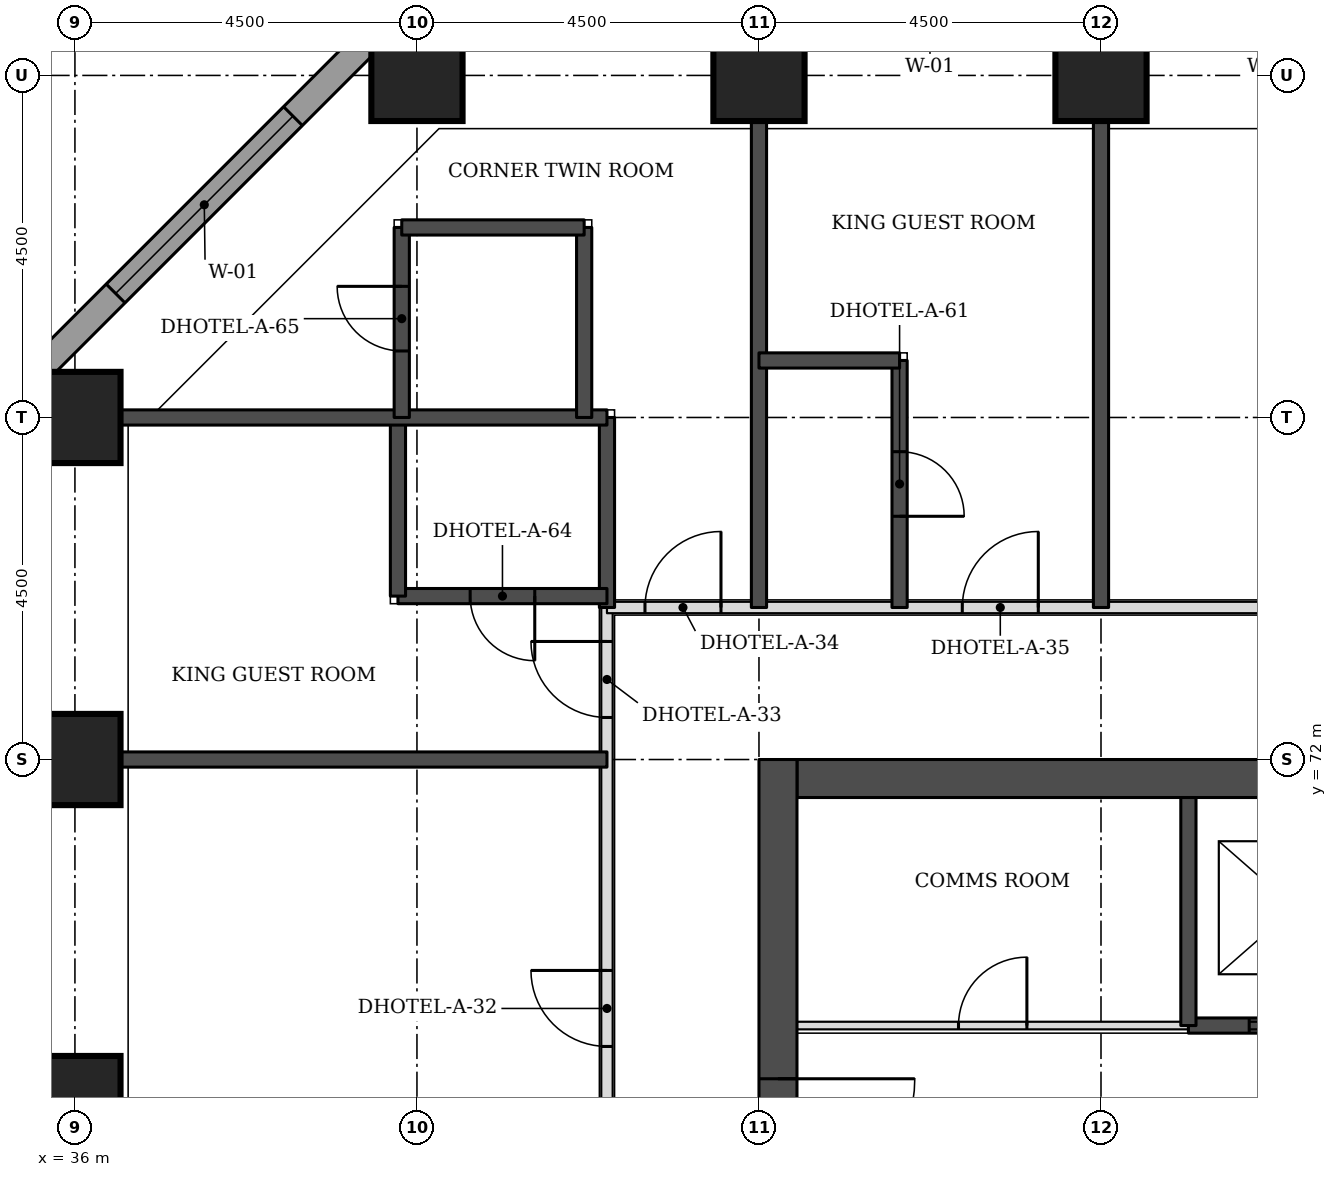
"""IFC4 building model, lengths in metres.
Left out: names, types, materials, properties, quantities, classifications, styles, units other than length and angle.
Written with IfcOpenShell. Run it as: python <this file> out.ifc"""

import sys

from ifc_helpers import new_model, si_unit, direction, frame, frame_2d, origin, origin_2d, place, context, subcontext, project, spatial, rectangle, extrude, element, fill, save


model = new_model("IFC4")
c1 = context("Model", 3, precision=1e-05, world=origin(), true_north=direction((0.0, 1.0)))
c2 = subcontext(c1, "Body", "Model", "MODEL_VIEW")
j1 = project(units=[si_unit("LENGTHUNIT", "METRE"), si_unit("PLANEANGLEUNIT", "RADIAN")], contexts=[c1])
p1 = place(None, origin())
s1 = spatial("IfcSite", under=j1, at=p1, CompositionType="ELEMENT")
p2 = place(p1, origin())
s2 = spatial("IfcBuilding", under=s1, at=p2, CompositionType="ELEMENT")
p3 = place(p2, frame((0.0, 0.0, 26.4)))
s3 = spatial("IfcBuildingStorey", under=s2, at=p3, CompositionType="ELEMENT", Elevation=26.4)
for number, where, z_axis, x_axis in (
    (1, (36.0, 67.5, 0.0), (0.0, 0.0, 1.0), (1.0, 0.0, 0.0)),
    (2, (36.0, 72.0, 0.0), (0.0, 0.0, 1.0), (1.0, 0.0, 0.0)),
    (3, (36.0, 76.5, 0.0), (0.0, 0.0, 1.0), (1.0, 0.0, 0.0)),
    (4, (40.5, 81.0, 0.0), (0.0, 0.0, 1.0), (1.0, 0.0, 0.0)),
    (5, (45.0, 81.0, 0.0), (0.0, 0.0, 1.0), (1.0, 0.0, 0.0)),
    (6, (49.5, 81.0, 0.0), (0.0, 0.0, 1.0), (1.0, 0.0, 0.0)),
):
    element("IfcColumn", number, at=place(p3, frame(where, z_axis=z_axis, x_axis=x_axis)), inside=s3, PredefinedType="COLUMN", context=c2, shape_type="SweptSolid", body=[
        extrude(rectangle(XDim=1.2, YDim=1.2, at=origin_2d()), origin(), (0.0, 0.0, 1.0), 3.3),
    ])
p4 = place(p3, frame((45.5, 71.75, 0.0), z_axis=(0.0, 0.0, 1.0), x_axis=(1.0, 0.0, 0.0)))
e7 = element("IfcWall", 7, at=p4, inside=s3, PredefinedType="SHEAR", context=c2, shape_type="SweptSolid", body=[
    extrude(rectangle(XDim=21.5, YDim=0.5, at=frame_2d((10.75, 0.0))), origin(), (0.0, 0.0, 1.0), 3.3),
])
p5 = place(p3, frame((45.25, 49.5, 0.0), z_axis=(0.0, 0.0, 1.0), x_axis=(0.0, 1.0, 0.0)))
e8 = element("IfcWall", 8, at=p5, inside=s3, PredefinedType="SHEAR", context=c2, shape_type="SweptSolid", body=[
    extrude(rectangle(XDim=22.5, YDim=0.5, at=frame_2d((11.25, 0.0))), origin(), (0.0, 0.0, 1.0), 3.3),
])
p6 = place(p5, frame((4.2, 0.0, 0.0)))
e9 = element("IfcOpeningElement", 9, at=p6, cuts=e8, PredefinedType="OPENING", context=c2, shape_type="SweptSolid", body=[
    extrude(rectangle(XDim=1.8, YDim=2.1, at=frame_2d((0.9, 1.05))), frame((0.0, 0.26, 0.0), z_axis=(0.0, -1.0, 0.0), x_axis=(1.0, 0.0, 0.0)), (0.0, 0.0, 1.0), 0.52),
])
p7 = place(p5, frame((6.9, 0.0, 0.0)))
e10 = element("IfcOpeningElement", 10, at=p7, cuts=e8, PredefinedType="OPENING", context=c2, shape_type="SweptSolid", body=[
    extrude(rectangle(XDim=1.1, YDim=2.1, at=frame_2d((0.55, 1.05))), frame((0.0, 0.26, 0.0), z_axis=(0.0, -1.0, 0.0), x_axis=(1.0, 0.0, 0.0)), (0.0, 0.0, 1.0), 0.52),
])
p8 = place(p5, frame((13.6, 0.0, 0.0)))
e11 = element("IfcOpeningElement", 11, at=p8, cuts=e8, PredefinedType="OPENING", context=c2, shape_type="SweptSolid", body=[
    extrude(rectangle(XDim=1.1, YDim=2.1, at=frame_2d((0.55, 1.05))), frame((0.0, 0.26, 0.0), z_axis=(0.0, -1.0, 0.0), x_axis=(1.0, 0.0, 0.0)), (0.0, 0.0, 1.0), 0.52),
])
p9 = place(p5, frame((16.5, 0.0, 0.0)))
e12 = element("IfcOpeningElement", 12, at=p9, cuts=e8, PredefinedType="OPENING", context=c2, shape_type="SweptSolid", body=[
    extrude(rectangle(XDim=1.8, YDim=2.1, at=frame_2d((0.9, 1.05))), frame((0.0, 0.26, 0.0), z_axis=(0.0, -1.0, 0.0), x_axis=(1.0, 0.0, 0.0)), (0.0, 0.0, 1.0), 0.52),
])
p10 = place(p3, frame((40.23, 81.826, 0.0), z_axis=(0.0, 0.0, 1.0), x_axis=(-0.707106781187, -0.707106781187, 0.0)))
e13 = element("IfcWall", 13, at=p10, inside=s3, PredefinedType="STANDARD", context=c2, shape_type="SweptSolid", body=[
    extrude(rectangle(XDim=7.151, YDim=0.35, at=frame_2d((3.576, 0.0))), origin(), (0.0, 0.0, 1.0), 3.055),
])
p11 = place(p10, frame((1.926, 0.0, 0.8)))
e14 = element("IfcOpeningElement", 14, at=p11, cuts=e13, PredefinedType="OPENING", context=c2, shape_type="SweptSolid", body=[
    extrude(rectangle(XDim=3.3, YDim=1.5, at=frame_2d((1.65, 0.75))), frame((0.0, 0.185, 0.0), z_axis=(0.0, -1.0, 0.0), x_axis=(1.0, 0.0, 0.0)), (0.0, 0.0, 1.0), 0.37),
])
p12 = place(p3, frame((43.0, 56.0, 0.0), z_axis=(0.0, 0.0, 1.0), x_axis=(0.0, 1.0, 0.0)))
e15 = element("IfcWall", 15, at=p12, inside=s3, PredefinedType="PARTITIONING", context=c2, shape_type="SweptSolid", body=[
    extrude(rectangle(XDim=18.0, YDim=0.15, at=frame_2d((9.0, 0.0))), origin(), (0.0, 0.0, 1.0), 3.08),
])
p13 = place(p12, frame((12.225, 0.0, 0.0)))
e16 = element("IfcOpeningElement", 16, at=p13, cuts=e15, PredefinedType="OPENING", context=c2, shape_type="SweptSolid", body=[
    extrude(rectangle(XDim=1.0, YDim=2.1, at=frame_2d((0.5, 1.05))), frame((0.0, 0.085, 0.0), z_axis=(0.0, -1.0, 0.0), x_axis=(1.0, 0.0, 0.0)), (0.0, 0.0, 1.0), 0.17),
])
p14 = place(p12, frame((16.553, 0.0, 0.0)))
e17 = element("IfcOpeningElement", 17, at=p14, cuts=e15, PredefinedType="OPENING", context=c2, shape_type="SweptSolid", body=[
    extrude(rectangle(XDim=1.0, YDim=2.1, at=frame_2d((0.5, 1.05))), frame((0.0, 0.085, 0.0), z_axis=(0.0, -1.0, 0.0), x_axis=(1.0, 0.0, 0.0)), (0.0, 0.0, 1.0), 0.17),
])
p15 = place(p12, frame((3.05, 0.0, 0.0)))
e18 = element("IfcOpeningElement", 18, at=p15, cuts=e15, PredefinedType="OPENING", context=c2, shape_type="SweptSolid", body=[
    extrude(rectangle(XDim=0.9, YDim=2.1, at=frame_2d((0.45, 1.05))), frame((0.0, 0.085, 0.0), z_axis=(0.0, -1.0, 0.0), x_axis=(1.0, 0.0, 0.0)), (0.0, 0.0, 1.0), 0.17),
])
p16 = place(p3, frame((43.0, 74.0, 0.0), z_axis=(0.0, 0.0, 1.0), x_axis=(1.0, 0.0, 0.0)))
e19 = element("IfcWall", 19, at=p16, inside=s3, PredefinedType="PARTITIONING", context=c2, shape_type="SweptSolid", body=[
    extrude(rectangle(XDim=26.5, YDim=0.15, at=frame_2d((13.25, 0.0))), origin(), (0.0, 0.0, 1.0), 3.08),
])
p17 = place(p16, frame((4.675, 0.0, 0.0)))
e20 = element("IfcOpeningElement", 20, at=p17, cuts=e19, PredefinedType="OPENING", context=c2, shape_type="SweptSolid", body=[
    extrude(rectangle(XDim=1.0, YDim=2.1, at=frame_2d((0.5, 1.05))), frame((0.0, 0.085, 0.0), z_axis=(0.0, -1.0, 0.0), x_axis=(1.0, 0.0, 0.0)), (0.0, 0.0, 1.0), 0.17),
])
p18 = place(p16, frame((9.025, 0.0, 0.0)))
e21 = element("IfcOpeningElement", 21, at=p18, cuts=e19, PredefinedType="OPENING", context=c2, shape_type="SweptSolid", body=[
    extrude(rectangle(XDim=1.0, YDim=2.1, at=frame_2d((0.5, 1.05))), frame((0.0, 0.085, 0.0), z_axis=(0.0, -1.0, 0.0), x_axis=(1.0, 0.0, 0.0)), (0.0, 0.0, 1.0), 0.17),
])
p19 = place(p16, frame((20.725, 0.0, 0.0)))
e22 = element("IfcOpeningElement", 22, at=p19, cuts=e19, PredefinedType="OPENING", context=c2, shape_type="SweptSolid", body=[
    extrude(rectangle(XDim=1.0, YDim=2.1, at=frame_2d((0.5, 1.05))), frame((0.0, 0.085, 0.0), z_axis=(0.0, -1.0, 0.0), x_axis=(1.0, 0.0, 0.0)), (0.0, 0.0, 1.0), 0.17),
])
p20 = place(p16, frame((0.5, 0.0, 0.0)))
e23 = element("IfcOpeningElement", 23, at=p20, cuts=e19, PredefinedType="OPENING", context=c2, shape_type="SweptSolid", body=[
    extrude(rectangle(XDim=1.0, YDim=2.1, at=frame_2d((0.5, 1.05))), frame((0.0, 0.085, 0.0), z_axis=(0.0, -1.0, 0.0), x_axis=(1.0, 0.0, 0.0)), (0.0, 0.0, 1.0), 0.17),
])
p21 = place(p16, frame((25.0, 0.0, 0.0)))
e24 = element("IfcOpeningElement", 24, at=p21, cuts=e19, PredefinedType="OPENING", context=c2, shape_type="SweptSolid", body=[
    extrude(rectangle(XDim=1.0, YDim=2.1, at=frame_2d((0.5, 1.05))), frame((0.0, 0.085, 0.0), z_axis=(0.0, -1.0, 0.0), x_axis=(1.0, 0.0, 0.0)), (0.0, 0.0, 1.0), 0.17),
])
p22 = place(p3, frame((36.6, 72.0, 0.0), z_axis=(0.0, 0.0, 1.0), x_axis=(1.0, 0.0, 0.0)))
e25 = element("IfcWall", 25, at=p22, inside=s3, PredefinedType="SOLIDWALL", context=c2, shape_type="SweptSolid", body=[
    extrude(rectangle(XDim=6.4, YDim=0.2, at=frame_2d((3.2, 0.0))), origin(), (0.0, 0.0, 1.0), 3.08),
])
p23 = place(p3, frame((43.0, 74.0, 0.0), z_axis=(0.0, 0.0, 1.0), x_axis=(0.0, 1.0, 0.0)))
e26 = element("IfcWall", 26, at=p23, inside=s3, PredefinedType="SOLIDWALL", context=c2, shape_type="SweptSolid", body=[
    extrude(rectangle(XDim=2.5, YDim=0.2, at=frame_2d((1.25, 0.0))), origin(), (0.0, 0.0, 1.0), 3.08),
])
p24 = place(p3, frame((45.0, 74.0, 0.0), z_axis=(0.0, 0.0, 1.0), x_axis=(0.0, 1.0, 0.0)))
e27 = element("IfcWall", 27, at=p24, inside=s3, PredefinedType="SOLIDWALL", context=c2, shape_type="SweptSolid", body=[
    extrude(rectangle(XDim=6.4, YDim=0.2, at=frame_2d((3.2, 0.0))), origin(), (0.0, 0.0, 1.0), 3.08),
])
p25 = place(p3, frame((46.85, 74.0, 0.0), z_axis=(0.0, 0.0, 1.0), x_axis=(0.0, 1.0, 0.0)))
e28 = element("IfcWall", 28, at=p25, inside=s3, PredefinedType="SOLIDWALL", context=c2, shape_type="SweptSolid", body=[
    extrude(rectangle(XDim=3.25, YDim=0.2, at=frame_2d((1.625, 0.0))), origin(), (0.0, 0.0, 1.0), 3.08),
])
p26 = place(p25, frame((1.2, 0.0, 0.0)))
e29 = element("IfcOpeningElement", 29, at=p26, cuts=e28, PredefinedType="OPENING", context=c2, shape_type="SweptSolid", body=[
    extrude(rectangle(XDim=0.85, YDim=2.1, at=frame_2d((0.425, 1.05))), frame((0.0, 0.11, 0.0), z_axis=(0.0, -1.0, 0.0), x_axis=(1.0, 0.0, 0.0)), (0.0, 0.0, 1.0), 0.22),
])
p27 = place(p3, frame((49.5, 74.0, 0.0), z_axis=(0.0, 0.0, 1.0), x_axis=(0.0, 1.0, 0.0)))
e30 = element("IfcWall", 30, at=p27, inside=s3, PredefinedType="SOLIDWALL", context=c2, shape_type="SweptSolid", body=[
    extrude(rectangle(XDim=6.4, YDim=0.2, at=frame_2d((3.2, 0.0))), origin(), (0.0, 0.0, 1.0), 3.08),
])
p28 = place(p3, frame((40.25, 74.15, 0.0), z_axis=(0.0, 0.0, 1.0), x_axis=(1.0, 0.0, 0.0)))
e31 = element("IfcWall", 31, at=p28, inside=s3, PredefinedType="SOLIDWALL", context=c2, shape_type="SweptSolid", body=[
    extrude(rectangle(XDim=2.75, YDim=0.2, at=frame_2d((1.375, 0.0))), origin(), (0.0, 0.0, 1.0), 3.08),
])
p29 = place(p28, frame((0.95, 0.0, 0.0)))
e32 = element("IfcOpeningElement", 32, at=p29, cuts=e31, PredefinedType="OPENING", context=c2, shape_type="SweptSolid", body=[
    extrude(rectangle(XDim=0.85, YDim=2.1, at=frame_2d((0.425, 1.05))), frame((0.0, 0.11, 0.0), z_axis=(0.0, -1.0, 0.0), x_axis=(1.0, 0.0, 0.0)), (0.0, 0.0, 1.0), 0.22),
])
p30 = place(p3, frame((40.25, 74.15, 0.0), z_axis=(0.0, 0.0, 1.0), x_axis=(0.0, 1.0, 0.0)))
e33 = element("IfcWall", 33, at=p30, inside=s3, PredefinedType="SOLIDWALL", context=c2, shape_type="SweptSolid", body=[
    extrude(rectangle(XDim=2.35, YDim=0.2, at=frame_2d((1.175, 0.0))), origin(), (0.0, 0.0, 1.0), 3.08),
])
p31 = place(p3, frame((36.6, 76.5, 0.0), z_axis=(0.0, 0.0, 1.0), x_axis=(1.0, 0.0, 0.0)))
e34 = element("IfcWall", 34, at=p31, inside=s3, PredefinedType="SOLIDWALL", context=c2, shape_type="SweptSolid", body=[
    extrude(rectangle(XDim=6.4, YDim=0.2, at=frame_2d((3.2, 0.0))), origin(), (0.0, 0.0, 1.0), 3.08),
])
p32 = place(p3, frame((40.3, 76.5, 0.0), z_axis=(0.0, 0.0, 1.0), x_axis=(0.0, 1.0, 0.0)))
e35 = element("IfcWall", 35, at=p32, inside=s3, PredefinedType="SOLIDWALL", context=c2, shape_type="SweptSolid", body=[
    extrude(rectangle(XDim=2.5, YDim=0.2, at=frame_2d((1.25, 0.0))), origin(), (0.0, 0.0, 1.0), 3.08),
])
p33 = place(p32, frame((0.875, 0.0, 0.0)))
e36 = element("IfcOpeningElement", 36, at=p33, cuts=e35, PredefinedType="OPENING", context=c2, shape_type="SweptSolid", body=[
    extrude(rectangle(XDim=0.85, YDim=2.1, at=frame_2d((0.425, 1.05))), frame((0.0, 0.11, 0.0), z_axis=(0.0, -1.0, 0.0), x_axis=(1.0, 0.0, 0.0)), (0.0, 0.0, 1.0), 0.22),
])
p34 = place(p3, frame((42.7, 76.5, 0.0), z_axis=(0.0, 0.0, 1.0), x_axis=(0.0, 1.0, 0.0)))
e37 = element("IfcWall", 37, at=p34, inside=s3, PredefinedType="SOLIDWALL", context=c2, shape_type="SweptSolid", body=[
    extrude(rectangle(XDim=2.5, YDim=0.2, at=frame_2d((1.25, 0.0))), origin(), (0.0, 0.0, 1.0), 3.08),
])
p35 = place(p3, frame((45.0, 77.25, 0.0), z_axis=(0.0, 0.0, 1.0), x_axis=(1.0, 0.0, 0.0)))
e38 = element("IfcWall", 38, at=p35, inside=s3, PredefinedType="SOLIDWALL", context=c2, shape_type="SweptSolid", body=[
    extrude(rectangle(XDim=1.85, YDim=0.2, at=frame_2d((0.925, 0.0))), origin(), (0.0, 0.0, 1.0), 3.08),
])
p36 = place(p3, frame((40.3, 79.0, 0.0), z_axis=(0.0, 0.0, 1.0), x_axis=(1.0, 0.0, 0.0)))
e39 = element("IfcWall", 39, at=p36, inside=s3, PredefinedType="SOLIDWALL", context=c2, shape_type="SweptSolid", body=[
    extrude(rectangle(XDim=2.4, YDim=0.2, at=frame_2d((1.2, 0.0))), origin(), (0.0, 0.0, 1.0), 3.08),
])
p37 = place(p3, frame((45.5, 68.5, 0.0), z_axis=(0.0, 0.0, 1.0), x_axis=(1.0, 0.0, 0.0)))
e40 = element("IfcWall", 40, at=p37, inside=s3, PredefinedType="PARTITIONING", context=c2, shape_type="SweptSolid", body=[
    extrude(rectangle(XDim=5.15, YDim=0.1, at=frame_2d((2.575, 0.0))), origin(), (0.0, 0.0, 1.0), 3.08),
])
p38 = place(p37, frame((2.125, 0.0, 0.0)))
e41 = element("IfcOpeningElement", 41, at=p38, cuts=e40, PredefinedType="OPENING", context=c2, shape_type="SweptSolid", body=[
    extrude(rectangle(XDim=0.9, YDim=2.1, at=frame_2d((0.45, 1.05))), frame((0.0, 0.06, 0.0), z_axis=(0.0, -1.0, 0.0), x_axis=(1.0, 0.0, 0.0)), (0.0, 0.0, 1.0), 0.12),
])
p39 = place(p3, frame((50.65, 68.5, 0.0), z_axis=(0.0, 0.0, 1.0), x_axis=(1.0, 0.0, 0.0)))
e42 = element("IfcWall", 42, at=p39, inside=s3, PredefinedType="SOLIDWALL", context=c2, shape_type="SweptSolid", body=[
    extrude(rectangle(XDim=11.2, YDim=0.2, at=frame_2d((5.6, 0.0))), origin(), (0.0, 0.0, 1.0), 3.08),
])
p40 = place(p39, frame((0.8, 0.0, 0.0)))
e43 = element("IfcOpeningElement", 43, at=p40, cuts=e42, PredefinedType="OPENING", context=c2, shape_type="SweptSolid", body=[
    extrude(rectangle(XDim=1.2, YDim=2.1, at=frame_2d((0.6, 1.05))), frame((0.0, 0.11, 0.0), z_axis=(0.0, -1.0, 0.0), x_axis=(1.0, 0.0, 0.0)), (0.0, 0.0, 1.0), 0.22),
])
p41 = place(p39, frame((3.6, 0.0, 0.0)))
e44 = element("IfcOpeningElement", 44, at=p41, cuts=e42, PredefinedType="OPENING", context=c2, shape_type="SweptSolid", body=[
    extrude(rectangle(XDim=1.2, YDim=2.1, at=frame_2d((0.6, 1.05))), frame((0.0, 0.11, 0.0), z_axis=(0.0, -1.0, 0.0), x_axis=(1.0, 0.0, 0.0)), (0.0, 0.0, 1.0), 0.22),
])
p42 = place(p39, frame((6.4, 0.0, 0.0)))
e45 = element("IfcOpeningElement", 45, at=p42, cuts=e42, PredefinedType="OPENING", context=c2, shape_type="SweptSolid", body=[
    extrude(rectangle(XDim=1.2, YDim=2.1, at=frame_2d((0.6, 1.05))), frame((0.0, 0.11, 0.0), z_axis=(0.0, -1.0, 0.0), x_axis=(1.0, 0.0, 0.0)), (0.0, 0.0, 1.0), 0.22),
])
p43 = place(p39, frame((9.2, 0.0, 0.0)))
e46 = element("IfcOpeningElement", 46, at=p43, cuts=e42, PredefinedType="OPENING", context=c2, shape_type="SweptSolid", body=[
    extrude(rectangle(XDim=1.2, YDim=2.1, at=frame_2d((0.6, 1.05))), frame((0.0, 0.11, 0.0), z_axis=(0.0, -1.0, 0.0), x_axis=(1.0, 0.0, 0.0)), (0.0, 0.0, 1.0), 0.22),
])
p44 = place(p3, frame((50.65, 68.5, 0.0), z_axis=(0.0, 0.0, 1.0), x_axis=(0.0, 1.0, 0.0)))
e47 = element("IfcWall", 47, at=p44, inside=s3, PredefinedType="SOLIDWALL", context=c2, shape_type="SweptSolid", body=[
    extrude(rectangle(XDim=3.0, YDim=0.2, at=frame_2d((1.5, 0.0))), origin(), (0.0, 0.0, 1.0), 3.08),
])
p45 = place(p11, origin())
e48 = element("IfcWindow", 48, at=p45, inside=s3, PartitioningType="SINGLE_PANEL", PredefinedType="WINDOW", context=c2, shape_type="SweptSolid", body=[
    extrude(rectangle(XDim=3.3, YDim=1.5, at=frame_2d((1.65, 0.75))), frame((0.0, 0.085, 0.0), z_axis=(0.0, -1.0, 0.0), x_axis=(1.0, 0.0, 0.0)), (0.0, 0.0, 1.0), 0.06),
])
fill(e14, e48)
p46 = place(p13, origin())
e49 = element("IfcDoor", 49, at=p46, inside=s3, OperationType="SINGLE_SWING_RIGHT", PredefinedType="DOOR", context=c2, shape_type="SweptSolid", body=[
    extrude(rectangle(XDim=1.0, YDim=2.1, at=frame_2d((0.5, 1.05))), frame((0.0, 0.025, 0.0), z_axis=(0.0, -1.0, 0.0), x_axis=(1.0, 0.0, 0.0)), (0.0, 0.0, 1.0), 0.05),
])
fill(e16, e49)
p47 = place(p14, origin())
e50 = element("IfcDoor", 50, at=p47, inside=s3, OperationType="SINGLE_SWING_RIGHT", PredefinedType="DOOR", context=c2, shape_type="SweptSolid", body=[
    extrude(rectangle(XDim=1.0, YDim=2.1, at=frame_2d((0.5, 1.05))), frame((0.0, 0.025, 0.0), z_axis=(0.0, -1.0, 0.0), x_axis=(1.0, 0.0, 0.0)), (0.0, 0.0, 1.0), 0.05),
])
fill(e17, e50)
p48 = place(p29, frame((0.85, 0.0, 0.0), z_axis=(0.0, 0.0, 1.0), x_axis=(-1.0, 0.0, 0.0)))
e51 = element("IfcDoor", 51, at=p48, inside=s3, OperationType="SINGLE_SWING_LEFT", PredefinedType="DOOR", context=c2, shape_type="SweptSolid", body=[
    extrude(rectangle(XDim=0.85, YDim=2.1, at=frame_2d((0.425, 1.05))), frame((0.0, 0.025, 0.0), z_axis=(0.0, -1.0, 0.0), x_axis=(1.0, 0.0, 0.0)), (0.0, 0.0, 1.0), 0.05),
])
fill(e32, e51)
p49 = place(p17, origin())
e52 = element("IfcDoor", 52, at=p49, inside=s3, OperationType="SINGLE_SWING_RIGHT", PredefinedType="DOOR", context=c2, shape_type="SweptSolid", body=[
    extrude(rectangle(XDim=1.0, YDim=2.1, at=frame_2d((0.5, 1.05))), frame((0.0, 0.025, 0.0), z_axis=(0.0, -1.0, 0.0), x_axis=(1.0, 0.0, 0.0)), (0.0, 0.0, 1.0), 0.05),
])
fill(e20, e52)
p50 = place(p26, frame((0.85, 0.0, 0.0), z_axis=(0.0, 0.0, 1.0), x_axis=(-1.0, 0.0, 0.0)))
e53 = element("IfcDoor", 53, at=p50, inside=s3, OperationType="SINGLE_SWING_RIGHT", PredefinedType="DOOR", context=c2, shape_type="SweptSolid", body=[
    extrude(rectangle(XDim=0.85, YDim=2.1, at=frame_2d((0.425, 1.05))), frame((0.0, 0.025, 0.0), z_axis=(0.0, -1.0, 0.0), x_axis=(1.0, 0.0, 0.0)), (0.0, 0.0, 1.0), 0.05),
])
fill(e29, e53)
p51 = place(p20, origin())
e54 = element("IfcDoor", 54, at=p51, inside=s3, OperationType="SINGLE_SWING_RIGHT", PredefinedType="DOOR", context=c2, shape_type="SweptSolid", body=[
    extrude(rectangle(XDim=1.0, YDim=2.1, at=frame_2d((0.5, 1.05))), frame((0.0, 0.025, 0.0), z_axis=(0.0, -1.0, 0.0), x_axis=(1.0, 0.0, 0.0)), (0.0, 0.0, 1.0), 0.05),
])
fill(e23, e54)
p52 = place(p33, origin())
e55 = element("IfcDoor", 55, at=p52, inside=s3, OperationType="SINGLE_SWING_RIGHT", PredefinedType="DOOR", context=c2, shape_type="SweptSolid", body=[
    extrude(rectangle(XDim=0.85, YDim=2.1, at=frame_2d((0.425, 1.05))), frame((0.0, 0.025, 0.0), z_axis=(0.0, -1.0, 0.0), x_axis=(1.0, 0.0, 0.0)), (0.0, 0.0, 1.0), 0.05),
])
fill(e36, e55)
p53 = place(p40, origin())
e56 = element("IfcDoor", 56, at=p53, inside=s3, OperationType="DOUBLE_DOOR_SLIDING", PredefinedType="DOOR", context=c2, shape_type="SweptSolid", body=[
    extrude(rectangle(XDim=1.2, YDim=2.1, at=frame_2d((0.6, 1.05))), frame((0.0, 0.025, 0.0), z_axis=(0.0, -1.0, 0.0), x_axis=(1.0, 0.0, 0.0)), (0.0, 0.0, 1.0), 0.05),
])
fill(e43, e56)
p54 = place(p9, frame((1.8, 0.0, 0.0), z_axis=(0.0, 0.0, 1.0), x_axis=(-1.0, 0.0, 0.0)))
e57 = element("IfcDoor", 57, at=p54, inside=s3, OperationType="SINGLE_SWING_LEFT", PredefinedType="DOOR", context=c2, shape_type="SweptSolid", body=[
    extrude(rectangle(XDim=1.8, YDim=2.1, at=frame_2d((0.9, 1.05))), frame((0.0, 0.025, 0.0), z_axis=(0.0, -1.0, 0.0), x_axis=(1.0, 0.0, 0.0)), (0.0, 0.0, 1.0), 0.05),
])
fill(e12, e57)
p55 = place(p38, origin())
e58 = element("IfcDoor", 58, at=p55, inside=s3, OperationType="SINGLE_SWING_RIGHT", PredefinedType="DOOR", context=c2, shape_type="SweptSolid", body=[
    extrude(rectangle(XDim=0.9, YDim=2.1, at=frame_2d((0.45, 1.05))), frame((0.0, 0.025, 0.0), z_axis=(0.0, -1.0, 0.0), x_axis=(1.0, 0.0, 0.0)), (0.0, 0.0, 1.0), 0.05),
])
fill(e41, e58)
save(model, sys.argv[1])
